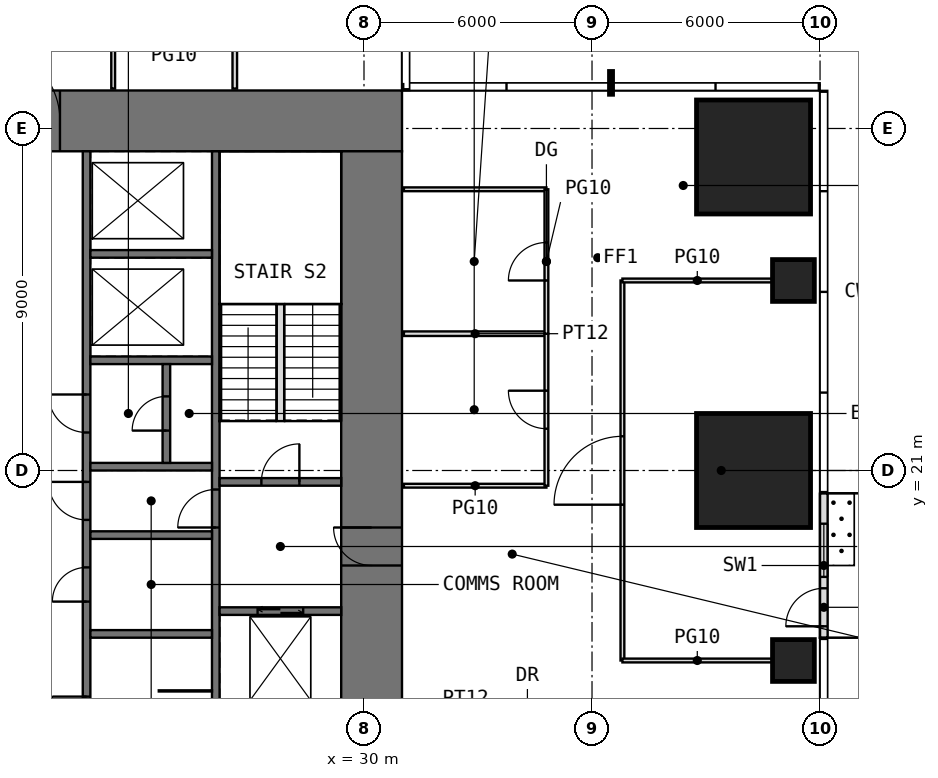
"""IFC4 building model, lengths in metres.
Left out: names, types, materials, properties, quantities, classifications, styles, units other than length and angle.
Written with IfcOpenShell. Run it as: python <this file> out.ifc"""

import sys

from ifc_helpers import new_model, si_unit, direction, frame, frame_2d, origin, origin_2d, place, context, subcontext, project, spatial, rectangle, extrude, element, fill, save


model = new_model("IFC4")
c1 = context("Model", 3, precision=1e-05, world=origin(), true_north=direction((0.0, 1.0)))
c2 = subcontext(c1, "Body", "Model", "MODEL_VIEW")
j1 = project(units=[si_unit("LENGTHUNIT", "METRE"), si_unit("PLANEANGLEUNIT", "RADIAN")], contexts=[c1])
p1 = place(None, origin())
s1 = spatial("IfcSite", under=j1, at=p1, CompositionType="ELEMENT")
p2 = place(p1, origin())
s2 = spatial("IfcBuilding", under=s1, at=p2, CompositionType="ELEMENT")
p3 = place(p2, frame((0.0, 0.0, 152.5)))
s3 = spatial("IfcBuildingStorey", under=s2, at=p3, CompositionType="ELEMENT", Elevation=152.5)
p4 = place(p3, frame((41.3, 16.0, 0.0), z_axis=(0.0, 0.0, 1.0), x_axis=(1.0, 0.0, 0.0)))
e1 = element("IfcColumn", 1, at=p4, inside=s3, PredefinedType="COLUMN", context=c2, shape_type="SweptSolid", body=[
    extrude(rectangle(XDim=1.1, YDim=1.1, at=origin_2d()), origin(), (0.0, 0.0, 1.0), 4.0),
])
p5 = place(p3, frame((40.25, 21.0, 0.0), z_axis=(0.0, 0.0, 1.0), x_axis=(1.0, 0.0, 0.0)))
e2 = element("IfcColumn", 2, at=p5, inside=s3, PredefinedType="COLUMN", context=c2, shape_type="SweptSolid", body=[
    extrude(rectangle(XDim=3.0, YDim=3.0, at=origin_2d()), origin(), (0.0, 0.0, 1.0), 4.0),
])
p6 = place(p3, frame((41.3, 26.0, 0.0), z_axis=(0.0, 0.0, 1.0), x_axis=(1.0, 0.0, 0.0)))
e3 = element("IfcColumn", 3, at=p6, inside=s3, PredefinedType="COLUMN", context=c2, shape_type="SweptSolid", body=[
    extrude(rectangle(XDim=1.1, YDim=1.1, at=origin_2d()), origin(), (0.0, 0.0, 1.0), 4.0),
])
p7 = place(p3, frame((40.25, 29.25, 0.0), z_axis=(0.0, 0.0, 1.0), x_axis=(1.0, 0.0, 0.0)))
e4 = element("IfcColumn", 4, at=p7, inside=s3, PredefinedType="COLUMN", context=c2, shape_type="SweptSolid", body=[
    extrude(rectangle(XDim=3.0, YDim=3.0, at=origin_2d()), origin(), (0.0, 0.0, 1.0), 4.0),
])
p8 = place(p3, frame((42.1, 16.6, 0.0), z_axis=(0.0, 0.0, 1.0), x_axis=(0.0, 1.0, 0.0)))
e5 = element("IfcWall", 5, at=p8, inside=s3, PredefinedType="USERDEFINED", context=c2, shape_type="SweptSolid", body=[
    extrude(rectangle(XDim=3.8, YDim=0.2, at=frame_2d((1.9, 0.0))), origin(), (0.0, 0.0, 1.0), 3.75),
])
p9 = place(p8, frame((0.3, 0.0, 0.0)))
e6 = element("IfcOpeningElement", 6, at=p9, cuts=e5, PredefinedType="OPENING", context=c2, shape_type="SweptSolid", body=[
    extrude(rectangle(XDim=1.0, YDim=2.4, at=frame_2d((0.5, 1.2))), frame((0.0, 0.11, 0.0), z_axis=(0.0, -1.0, 0.0), x_axis=(1.0, 0.0, 0.0)), (0.0, 0.0, 1.0), 0.22),
])
p10 = place(p8, frame((1.6, 0.0, 0.3)))
e7 = element("IfcOpeningElement", 7, at=p10, cuts=e5, PredefinedType="OPENING", context=c2, shape_type="SweptSolid", body=[
    extrude(rectangle(XDim=1.4, YDim=2.7, at=frame_2d((0.7, 1.35))), frame((0.0, 0.11, 0.0), z_axis=(0.0, -1.0, 0.0), x_axis=(1.0, 0.0, 0.0)), (0.0, 0.0, 1.0), 0.22),
])
p11 = place(p3, frame((11.0, 30.2, -0.05), z_axis=(0.0, 0.0, 1.0), x_axis=(1.0, 0.0, 0.0)))
e8 = element("IfcWall", 8, at=p11, inside=s3, PredefinedType="SHEAR", context=c2, shape_type="SweptSolid", body=[
    extrude(rectangle(XDim=20.0, YDim=1.6, at=frame_2d((10.0, 0.0))), origin(), (0.0, 0.0, 1.0), 4.0),
])
p12 = place(p11, frame((9.0, 0.0, 0.05)))
e9 = element("IfcOpeningElement", 9, at=p12, cuts=e8, PredefinedType="OPENING", context=c2, shape_type="SweptSolid", body=[
    extrude(rectangle(XDim=2.0, YDim=2.2, at=frame_2d((1.0, 1.1))), frame((0.0, 0.81, 0.0), z_axis=(0.0, -1.0, 0.0), x_axis=(1.0, 0.0, 0.0)), (0.0, 0.0, 1.0), 1.62),
])
p13 = place(p3, frame((30.2, 12.6, -0.05), z_axis=(0.0, 0.0, 1.0), x_axis=(0.0, 1.0, 0.0)))
e10 = element("IfcWall", 10, at=p13, inside=s3, PredefinedType="SHEAR", context=c2, shape_type="SweptSolid", body=[
    extrude(rectangle(XDim=16.8, YDim=1.6, at=frame_2d((8.4, 0.0))), origin(), (0.0, 0.0, 1.0), 4.0),
])
p14 = place(p13, frame((5.9, 0.0, 0.05)))
e11 = element("IfcOpeningElement", 11, at=p14, cuts=e10, PredefinedType="OPENING", context=c2, shape_type="SweptSolid", body=[
    extrude(rectangle(XDim=1.0, YDim=2.2, at=frame_2d((0.5, 1.1))), frame((0.0, 0.81, 0.0), z_axis=(0.0, -1.0, 0.0), x_axis=(1.0, 0.0, 0.0)), (0.0, 0.0, 1.0), 1.62),
])
p15 = place(p3, frame((22.7, 12.6, -0.05), z_axis=(0.0, 0.0, 1.0), x_axis=(0.0, 1.0, 0.0)))
e12 = element("IfcWall", 12, at=p15, inside=s3, PredefinedType="SHEAR", context=c2, shape_type="SweptSolid", body=[
    extrude(rectangle(XDim=16.8, YDim=0.2, at=frame_2d((8.4, 0.0))), origin(), (0.0, 0.0, 1.0), 4.0),
])
p16 = place(p15, frame((7.1, 0.0, 0.05)))
e13 = element("IfcOpeningElement", 13, at=p16, cuts=e12, PredefinedType="OPENING", context=c2, shape_type="SweptSolid", body=[
    extrude(rectangle(XDim=1.0, YDim=2.2, at=frame_2d((0.5, 1.1))), frame((0.0, 0.11, 0.0), z_axis=(0.0, -1.0, 0.0), x_axis=(1.0, 0.0, 0.0)), (0.0, 0.0, 1.0), 0.22),
])
p17 = place(p15, frame((1.55, 0.0, 0.05)))
e14 = element("IfcOpeningElement", 14, at=p17, cuts=e12, PredefinedType="OPENING", context=c2, shape_type="SweptSolid", body=[
    extrude(rectangle(XDim=0.9, YDim=2.2, at=frame_2d((0.45, 1.1))), frame((0.0, 0.11, 0.0), z_axis=(0.0, -1.0, 0.0), x_axis=(1.0, 0.0, 0.0)), (0.0, 0.0, 1.0), 0.22),
])
p18 = place(p15, frame((4.95, 0.0, 0.05)))
e15 = element("IfcOpeningElement", 15, at=p18, cuts=e12, PredefinedType="OPENING", context=c2, shape_type="SweptSolid", body=[
    extrude(rectangle(XDim=0.9, YDim=2.2, at=frame_2d((0.45, 1.1))), frame((0.0, 0.11, 0.0), z_axis=(0.0, -1.0, 0.0), x_axis=(1.0, 0.0, 0.0)), (0.0, 0.0, 1.0), 0.22),
])
p19 = place(p15, frame((9.4, 0.0, 0.05)))
e16 = element("IfcOpeningElement", 16, at=p19, cuts=e12, PredefinedType="OPENING", context=c2, shape_type="SweptSolid", body=[
    extrude(rectangle(XDim=1.0, YDim=2.2, at=frame_2d((0.5, 1.1))), frame((0.0, 0.11, 0.0), z_axis=(0.0, -1.0, 0.0), x_axis=(1.0, 0.0, 0.0)), (0.0, 0.0, 1.0), 0.22),
])
p20 = place(p3, frame((26.1, 12.6, -0.05), z_axis=(0.0, 0.0, 1.0), x_axis=(0.0, 1.0, 0.0)))
e17 = element("IfcWall", 17, at=p20, inside=s3, PredefinedType="SHEAR", context=c2, shape_type="SweptSolid", body=[
    extrude(rectangle(XDim=16.8, YDim=0.2, at=frame_2d((8.4, 0.0))), origin(), (0.0, 0.0, 1.0), 4.0),
])
p21 = place(p20, frame((6.9, 0.0, 0.05)))
e18 = element("IfcOpeningElement", 18, at=p21, cuts=e17, PredefinedType="OPENING", context=c2, shape_type="SweptSolid", body=[
    extrude(rectangle(XDim=1.0, YDim=2.2, at=frame_2d((0.5, 1.1))), frame((0.0, 0.11, 0.0), z_axis=(0.0, -1.0, 0.0), x_axis=(1.0, 0.0, 0.0)), (0.0, 0.0, 1.0), 0.22),
])
for number, where, z_axis, x_axis in (
    (19, (22.8, 16.7, -0.05), (0.0, 0.0, 1.0), (1.0, 0.0, 0.0)),
    (20, (22.8, 19.3, -0.05), (0.0, 0.0, 1.0), (1.0, 0.0, 0.0)),
    (21, (22.8, 21.1, -0.05), (0.0, 0.0, 1.0), (1.0, 0.0, 0.0)),
    (22, (22.8, 23.9, -0.05), (0.0, 0.0, 1.0), (1.0, 0.0, 0.0)),
    (23, (22.8, 26.7, -0.05), (0.0, 0.0, 1.0), (1.0, 0.0, 0.0)),
):
    element("IfcWall", number, at=place(p3, frame(where, z_axis=z_axis, x_axis=x_axis)), inside=s3, PredefinedType="SHEAR", context=c2, shape_type="SweptSolid", body=[
        extrude(rectangle(XDim=3.2, YDim=0.2, at=frame_2d((1.6, 0.0))), origin(), (0.0, 0.0, 1.0), 4.0),
    ])
p22 = place(p3, frame((26.2, 17.3, -0.05), z_axis=(0.0, 0.0, 1.0), x_axis=(1.0, 0.0, 0.0)))
e24 = element("IfcWall", 24, at=p22, inside=s3, PredefinedType="SHEAR", context=c2, shape_type="SweptSolid", body=[
    extrude(rectangle(XDim=3.2, YDim=0.2, at=frame_2d((1.6, 0.0))), origin(), (0.0, 0.0, 1.0), 4.0),
])
p23 = place(p22, frame((1.0, 0.0, 0.05)))
e25 = element("IfcOpeningElement", 25, at=p23, cuts=e24, PredefinedType="OPENING", context=c2, shape_type="SweptSolid", body=[
    extrude(rectangle(XDim=1.2, YDim=2.2, at=frame_2d((0.6, 1.1))), frame((0.0, 0.11, 0.0), z_axis=(0.0, -1.0, 0.0), x_axis=(1.0, 0.0, 0.0)), (0.0, 0.0, 1.0), 0.22),
])
p24 = place(p3, frame((26.2, 20.7, -0.05), z_axis=(0.0, 0.0, 1.0), x_axis=(1.0, 0.0, 0.0)))
e26 = element("IfcWall", 26, at=p24, inside=s3, PredefinedType="SHEAR", context=c2, shape_type="SweptSolid", body=[
    extrude(rectangle(XDim=3.2, YDim=0.2, at=frame_2d((1.6, 0.0))), origin(), (0.0, 0.0, 1.0), 4.0),
])
p25 = place(p24, frame((1.1, 0.0, 0.05)))
e27 = element("IfcOpeningElement", 27, at=p25, cuts=e26, PredefinedType="OPENING", context=c2, shape_type="SweptSolid", body=[
    extrude(rectangle(XDim=1.0, YDim=2.2, at=frame_2d((0.5, 1.1))), frame((0.0, 0.11, 0.0), z_axis=(0.0, -1.0, 0.0), x_axis=(1.0, 0.0, 0.0)), (0.0, 0.0, 1.0), 0.22),
])
p26 = place(p3, frame((24.6, 15.2, 0.0), z_axis=(0.0, 0.0, 1.0), x_axis=(1.0, 0.0, 0.0)))
e28 = element("IfcWall", 28, at=p26, inside=s3, PredefinedType="PARTITIONING", context=c2, shape_type="SweptSolid", body=[
    extrude(rectangle(XDim=1.4, YDim=0.03, at=frame_2d((0.7, 0.0))), origin(), (0.0, 0.0, 1.0), 3.75),
])
p27 = place(p3, frame((24.8, 21.2, -0.05), z_axis=(0.0, 0.0, 1.0), x_axis=(0.0, 1.0, 0.0)))
e29 = element("IfcWall", 29, at=p27, inside=s3, PredefinedType="SHEAR", context=c2, shape_type="SweptSolid", body=[
    extrude(rectangle(XDim=2.6, YDim=0.2, at=frame_2d((1.3, 0.0))), origin(), (0.0, 0.0, 1.0), 4.0),
])
p28 = place(p27, frame((0.85, 0.0, 0.05)))
e30 = element("IfcOpeningElement", 30, at=p28, cuts=e29, PredefinedType="OPENING", context=c2, shape_type="SweptSolid", body=[
    extrude(rectangle(XDim=0.9, YDim=2.2, at=frame_2d((0.45, 1.1))), frame((0.0, 0.11, 0.0), z_axis=(0.0, -1.0, 0.0), x_axis=(1.0, 0.0, 0.0)), (0.0, 0.0, 1.0), 0.22),
])
p29 = place(p3, frame((23.4, 31.05, 0.0), z_axis=(0.0, 0.0, 1.0), x_axis=(0.0, 1.0, 0.0)))
e31 = element("IfcWall", 31, at=p29, inside=s3, PredefinedType="PARTITIONING", context=c2, shape_type="SweptSolid", body=[
    extrude(rectangle(XDim=3.75, YDim=0.1, at=frame_2d((1.875, 0.0))), origin(), (0.0, 0.0, 1.0), 3.75),
])
p30 = place(p3, frame((26.6, 31.05, 0.0), z_axis=(0.0, 0.0, 1.0), x_axis=(0.0, 1.0, 0.0)))
e32 = element("IfcWall", 32, at=p30, inside=s3, PredefinedType="PARTITIONING", context=c2, shape_type="SweptSolid", body=[
    extrude(rectangle(XDim=3.25, YDim=0.12, at=frame_2d((1.625, 0.0))), origin(), (0.0, 0.0, 1.0), 3.75),
])
p31 = place(p3, frame((31.05, 20.6, 0.0), z_axis=(0.0, 0.0, 1.0), x_axis=(1.0, 0.0, 0.0)))
e33 = element("IfcWall", 33, at=p31, inside=s3, PredefinedType="PARTITIONING", context=c2, shape_type="SweptSolid", body=[
    extrude(rectangle(XDim=3.75, YDim=0.1, at=frame_2d((1.875, 0.0))), origin(), (0.0, 0.0, 1.0), 3.75),
])
p32 = place(p3, frame((31.05, 24.6, 0.0), z_axis=(0.0, 0.0, 1.0), x_axis=(1.0, 0.0, 0.0)))
e34 = element("IfcWall", 34, at=p32, inside=s3, PredefinedType="PARTITIONING", context=c2, shape_type="SweptSolid", body=[
    extrude(rectangle(XDim=3.75, YDim=0.12, at=frame_2d((1.875, 0.0))), origin(), (0.0, 0.0, 1.0), 3.75),
])
p33 = place(p3, frame((31.05, 28.4, 0.0), z_axis=(0.0, 0.0, 1.0), x_axis=(1.0, 0.0, 0.0)))
e35 = element("IfcWall", 35, at=p33, inside=s3, PredefinedType="PARTITIONING", context=c2, shape_type="SweptSolid", body=[
    extrude(rectangle(XDim=3.75, YDim=0.1, at=frame_2d((1.875, 0.0))), origin(), (0.0, 0.0, 1.0), 3.75),
])
p34 = place(p3, frame((34.8, 20.6, 0.0), z_axis=(0.0, 0.0, 1.0), x_axis=(0.0, 1.0, 0.0)))
e36 = element("IfcWall", 36, at=p34, inside=s3, PredefinedType="PARTITIONING", context=c2, shape_type="SweptSolid", body=[
    extrude(rectangle(XDim=4.0, YDim=0.1, at=frame_2d((2.0, 0.0))), origin(), (0.0, 0.0, 1.0), 3.75),
])
p35 = place(p34, frame((1.5, 0.0, 0.0)))
e37 = element("IfcOpeningElement", 37, at=p35, cuts=e36, PredefinedType="OPENING", context=c2, shape_type="SweptSolid", body=[
    extrude(rectangle(XDim=1.0, YDim=2.4, at=frame_2d((0.5, 1.2))), frame((0.0, 0.06, 0.0), z_axis=(0.0, -1.0, 0.0), x_axis=(1.0, 0.0, 0.0)), (0.0, 0.0, 1.0), 0.12),
])
p36 = place(p3, frame((34.8, 24.6, 0.0), z_axis=(0.0, 0.0, 1.0), x_axis=(0.0, 1.0, 0.0)))
e38 = element("IfcWall", 38, at=p36, inside=s3, PredefinedType="PARTITIONING", context=c2, shape_type="SweptSolid", body=[
    extrude(rectangle(XDim=3.8, YDim=0.1, at=frame_2d((1.9, 0.0))), origin(), (0.0, 0.0, 1.0), 3.75),
])
p37 = place(p36, frame((1.4, 0.0, 0.0)))
e39 = element("IfcOpeningElement", 39, at=p37, cuts=e38, PredefinedType="OPENING", context=c2, shape_type="SweptSolid", body=[
    extrude(rectangle(XDim=1.0, YDim=2.4, at=frame_2d((0.5, 1.2))), frame((0.0, 0.06, 0.0), z_axis=(0.0, -1.0, 0.0), x_axis=(1.0, 0.0, 0.0)), (0.0, 0.0, 1.0), 0.12),
])
p38 = place(p3, frame((36.8, 16.0, 0.0), z_axis=(0.0, 0.0, 1.0), x_axis=(0.0, 1.0, 0.0)))
e40 = element("IfcWall", 40, at=p38, inside=s3, PredefinedType="PARTITIONING", context=c2, shape_type="SweptSolid", body=[
    extrude(rectangle(XDim=10.0, YDim=0.1, at=frame_2d((5.0, 0.0))), origin(), (0.0, 0.0, 1.0), 3.75),
])
p39 = place(p38, frame((4.1, 0.0, 0.0)))
e41 = element("IfcOpeningElement", 41, at=p39, cuts=e40, PredefinedType="OPENING", context=c2, shape_type="SweptSolid", body=[
    extrude(rectangle(XDim=1.8, YDim=2.4, at=frame_2d((0.9, 1.2))), frame((0.0, 0.06, 0.0), z_axis=(0.0, -1.0, 0.0), x_axis=(1.0, 0.0, 0.0)), (0.0, 0.0, 1.0), 0.12),
])
for number, where, z_axis, x_axis in (
    (42, (36.8, 16.0, 0.0), (0.0, 0.0, 1.0), (1.0, 0.0, 0.0)),
    (43, (36.8, 26.0, 0.0), (0.0, 0.0, 1.0), (1.0, 0.0, 0.0)),
):
    element("IfcWall", number, at=place(p3, frame(where, z_axis=z_axis, x_axis=x_axis)), inside=s3, PredefinedType="PARTITIONING", context=c2, shape_type="SweptSolid", body=[
        extrude(rectangle(XDim=3.94, YDim=0.1, at=frame_2d((1.97, 0.0))), origin(), (0.0, 0.0, 1.0), 3.75),
    ])
p40 = place(p3, frame((27.8, 22.3, 0.0), z_axis=(0.0, 0.0, 1.0), x_axis=(0.0, 1.0, 0.0)))
e44 = element("IfcWall", 44, at=p40, inside=s3, PredefinedType="PARTITIONING", context=c2, shape_type="SweptSolid", body=[
    extrude(rectangle(XDim=3.08, YDim=0.2, at=frame_2d((1.54, 0.0))), origin(), (0.0, 0.0, 1.0), 4.0),
])
p41 = place(p9, origin())
e45 = element("IfcDoor", 45, at=p41, inside=s3, OperationType="SINGLE_SWING_LEFT", PredefinedType="DOOR", context=c2, shape_type="SweptSolid", body=[
    extrude(rectangle(XDim=1.0, YDim=2.4, at=frame_2d((0.5, 1.2))), frame((0.0, 0.025, 0.0), z_axis=(0.0, -1.0, 0.0), x_axis=(1.0, 0.0, 0.0)), (0.0, 0.0, 1.0), 0.05),
])
fill(e6, e45)
p42 = place(p10, origin())
e46 = element("IfcWindow", 46, at=p42, inside=s3, PartitioningType="SINGLE_PANEL", PredefinedType="WINDOW", context=c2, shape_type="SweptSolid", body=[
    extrude(rectangle(XDim=1.4, YDim=2.7, at=frame_2d((0.7, 1.35))), frame((0.0, 0.03, 0.0), z_axis=(0.0, -1.0, 0.0), x_axis=(1.0, 0.0, 0.0)), (0.0, 0.0, 1.0), 0.06),
])
fill(e7, e46)
p43 = place(p12, origin())
e47 = element("IfcDoor", 47, at=p43, inside=s3, OperationType="DOUBLE_DOOR_SINGLE_SWING", PredefinedType="DOOR", context=c2, shape_type="SweptSolid", body=[
    extrude(rectangle(XDim=2.0, YDim=2.2, at=frame_2d((1.0, 1.1))), frame((0.0, 0.025, 0.0), z_axis=(0.0, -1.0, 0.0), x_axis=(1.0, 0.0, 0.0)), (0.0, 0.0, 1.0), 0.05),
])
fill(e9, e47)
p44 = place(p14, origin())
e48 = element("IfcDoor", 48, at=p44, inside=s3, OperationType="SINGLE_SWING_RIGHT", PredefinedType="DOOR", context=c2, shape_type="SweptSolid", body=[
    extrude(rectangle(XDim=1.0, YDim=2.2, at=frame_2d((0.5, 1.1))), frame((0.0, 0.025, 0.0), z_axis=(0.0, -1.0, 0.0), x_axis=(1.0, 0.0, 0.0)), (0.0, 0.0, 1.0), 0.05),
])
fill(e11, e48)
p45 = place(p25, origin())
e49 = element("IfcDoor", 49, at=p45, inside=s3, OperationType="SINGLE_SWING_RIGHT", PredefinedType="DOOR", context=c2, shape_type="SweptSolid", body=[
    extrude(rectangle(XDim=1.0, YDim=2.2, at=frame_2d((0.5, 1.1))), frame((0.0, 0.025, 0.0), z_axis=(0.0, -1.0, 0.0), x_axis=(1.0, 0.0, 0.0)), (0.0, 0.0, 1.0), 0.05),
])
fill(e27, e49)
p46 = place(p21, origin())
e50 = element("IfcDoor", 50, at=p46, inside=s3, OperationType="SINGLE_SWING_LEFT", PredefinedType="DOOR", context=c2, shape_type="SweptSolid", body=[
    extrude(rectangle(XDim=1.0, YDim=2.2, at=frame_2d((0.5, 1.1))), frame((0.0, 0.025, 0.0), z_axis=(0.0, -1.0, 0.0), x_axis=(1.0, 0.0, 0.0)), (0.0, 0.0, 1.0), 0.05),
])
fill(e18, e50)
p47 = place(p16, origin())
e51 = element("IfcDoor", 51, at=p47, inside=s3, OperationType="SINGLE_SWING_RIGHT", PredefinedType="DOOR", context=c2, shape_type="SweptSolid", body=[
    extrude(rectangle(XDim=1.0, YDim=2.2, at=frame_2d((0.5, 1.1))), frame((0.0, 0.025, 0.0), z_axis=(0.0, -1.0, 0.0), x_axis=(1.0, 0.0, 0.0)), (0.0, 0.0, 1.0), 0.05),
])
fill(e13, e51)
p48 = place(p17, origin())
e52 = element("IfcDoor", 52, at=p48, inside=s3, OperationType="SINGLE_SWING_RIGHT", PredefinedType="DOOR", context=c2, shape_type="SweptSolid", body=[
    extrude(rectangle(XDim=0.9, YDim=2.2, at=frame_2d((0.45, 1.1))), frame((0.0, 0.025, 0.0), z_axis=(0.0, -1.0, 0.0), x_axis=(1.0, 0.0, 0.0)), (0.0, 0.0, 1.0), 0.05),
])
fill(e14, e52)
p49 = place(p18, origin())
e53 = element("IfcDoor", 53, at=p49, inside=s3, OperationType="SINGLE_SWING_LEFT", PredefinedType="DOOR", context=c2, shape_type="SweptSolid", body=[
    extrude(rectangle(XDim=0.9, YDim=2.2, at=frame_2d((0.45, 1.1))), frame((0.0, 0.025, 0.0), z_axis=(0.0, -1.0, 0.0), x_axis=(1.0, 0.0, 0.0)), (0.0, 0.0, 1.0), 0.05),
])
fill(e15, e53)
p50 = place(p19, origin())
e54 = element("IfcDoor", 54, at=p50, inside=s3, OperationType="SINGLE_SWING_RIGHT", PredefinedType="DOOR", context=c2, shape_type="SweptSolid", body=[
    extrude(rectangle(XDim=1.0, YDim=2.2, at=frame_2d((0.5, 1.1))), frame((0.0, 0.025, 0.0), z_axis=(0.0, -1.0, 0.0), x_axis=(1.0, 0.0, 0.0)), (0.0, 0.0, 1.0), 0.05),
])
fill(e16, e54)
p51 = place(p28, origin())
e55 = element("IfcDoor", 55, at=p51, inside=s3, OperationType="SINGLE_SWING_LEFT", PredefinedType="DOOR", context=c2, shape_type="SweptSolid", body=[
    extrude(rectangle(XDim=0.9, YDim=2.2, at=frame_2d((0.45, 1.1))), frame((0.0, 0.025, 0.0), z_axis=(0.0, -1.0, 0.0), x_axis=(1.0, 0.0, 0.0)), (0.0, 0.0, 1.0), 0.05),
])
fill(e30, e55)
p52 = place(p35, origin())
e56 = element("IfcDoor", 56, at=p52, inside=s3, OperationType="SINGLE_SWING_RIGHT", PredefinedType="DOOR", context=c2, shape_type="SweptSolid", body=[
    extrude(rectangle(XDim=1.0, YDim=2.4, at=frame_2d((0.5, 1.2))), frame((0.0, 0.025, 0.0), z_axis=(0.0, -1.0, 0.0), x_axis=(1.0, 0.0, 0.0)), (0.0, 0.0, 1.0), 0.05),
])
fill(e37, e56)
p53 = place(p37, origin())
e57 = element("IfcDoor", 57, at=p53, inside=s3, OperationType="SINGLE_SWING_LEFT", PredefinedType="DOOR", context=c2, shape_type="SweptSolid", body=[
    extrude(rectangle(XDim=1.0, YDim=2.4, at=frame_2d((0.5, 1.2))), frame((0.0, 0.025, 0.0), z_axis=(0.0, -1.0, 0.0), x_axis=(1.0, 0.0, 0.0)), (0.0, 0.0, 1.0), 0.05),
])
fill(e39, e57)
p54 = place(p39, origin())
e58 = element("IfcDoor", 58, at=p54, inside=s3, OperationType="DOUBLE_DOOR_SINGLE_SWING", PredefinedType="DOOR", context=c2, shape_type="SweptSolid", body=[
    extrude(rectangle(XDim=1.8, YDim=2.4, at=frame_2d((0.9, 1.2))), frame((0.0, 0.025, 0.0), z_axis=(0.0, -1.0, 0.0), x_axis=(1.0, 0.0, 0.0)), (0.0, 0.0, 1.0), 0.05),
])
fill(e41, e58)
p55 = place(p23, origin())
e59 = element("IfcDoor", 59, at=p55, inside=s3, OperationType="DOUBLE_DOOR_SLIDING", PredefinedType="DOOR", context=c2, shape_type="SweptSolid", body=[
    extrude(rectangle(XDim=1.2, YDim=2.2, at=frame_2d((0.6, 1.1))), frame((0.0, 0.025, 0.0), z_axis=(0.0, -1.0, 0.0), x_axis=(1.0, 0.0, 0.0)), (0.0, 0.0, 1.0), 0.05),
])
fill(e25, e59)
save(model, sys.argv[1])
